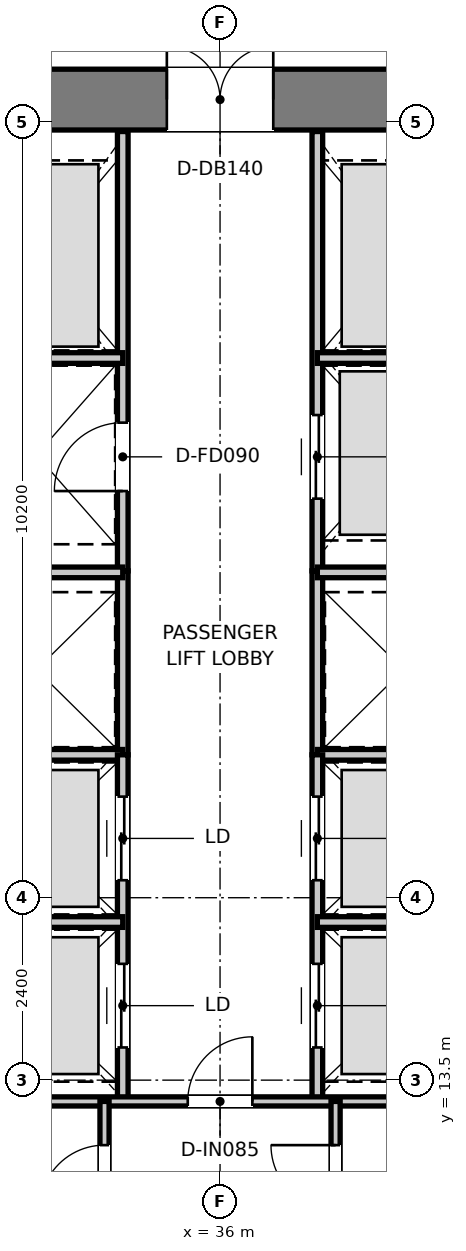
"""IFC4 building model, lengths in metres.
Left out: names, types, materials, properties, quantities, classifications, styles, units other than length and angle.
Written with IfcOpenShell. Run it as: python <this file> out.ifc"""

import sys

from ifc_helpers import new_model, si_unit, direction, frame, frame_2d, origin, place, context, subcontext, project, spatial, rectangle, extrude, element, fill, save


model = new_model("IFC4")
c1 = context("Model", 3, precision=1e-05, world=origin(), true_north=direction((0.0, 1.0)))
c2 = subcontext(c1, "Body", "Model", "MODEL_VIEW")
j1 = project(units=[si_unit("LENGTHUNIT", "METRE"), si_unit("PLANEANGLEUNIT", "RADIAN")], contexts=[c1])
p1 = place(None, origin())
s1 = spatial("IfcSite", under=j1, at=p1, CompositionType="ELEMENT")
p2 = place(p1, origin())
s2 = spatial("IfcBuilding", under=s1, at=p2, CompositionType="ELEMENT")
p3 = place(p2, frame((0.0, 0.0, 105.85)))
s3 = spatial("IfcBuildingStorey", under=s2, at=p3, CompositionType="ELEMENT", Elevation=105.85)
p4 = place(p3, frame((28.08, 26.4, 0.0), z_axis=(0.0, 0.0, 1.0), x_axis=(1.0, 0.0, 0.0)))
e1 = element("IfcWall", 1, at=p4, inside=s3, PredefinedType="SHEAR", context=c2, shape_type="SweptSolid", body=[
    extrude(rectangle(XDim=15.84, YDim=0.8, at=frame_2d((7.92, 0.0))), origin(), (0.0, 0.0, 1.0), 3.95),
])
p5 = place(p4, frame((7.22, 0.0, 0.0)))
e2 = element("IfcOpeningElement", 2, at=p5, cuts=e1, PredefinedType="OPENING", context=c2, shape_type="SweptSolid", body=[
    extrude(rectangle(XDim=1.4, YDim=2.2, at=frame_2d((0.7, 1.1))), frame((0.0, 0.41, 0.0), z_axis=(0.0, -1.0, 0.0), x_axis=(1.0, 0.0, 0.0)), (0.0, 0.0, 1.0), 0.82),
])
p6 = place(p4, frame((1.775, 0.0, 0.0)))
e3 = element("IfcOpeningElement", 3, at=p6, cuts=e1, PredefinedType="OPENING", context=c2, shape_type="SweptSolid", body=[
    extrude(rectangle(XDim=1.05, YDim=2.1, at=frame_2d((0.525, 1.05))), frame((0.0, 0.41, 0.0), z_axis=(0.0, -1.0, 0.0), x_axis=(1.0, 0.0, 0.0)), (0.0, 0.0, 1.0), 0.82),
])
p7 = place(p4, frame((13.015, 0.0, 0.0)))
e4 = element("IfcOpeningElement", 4, at=p7, cuts=e1, PredefinedType="OPENING", context=c2, shape_type="SweptSolid", body=[
    extrude(rectangle(XDim=1.05, YDim=2.1, at=frame_2d((0.525, 1.05))), frame((0.0, 0.41, 0.0), z_axis=(0.0, -1.0, 0.0), x_axis=(1.0, 0.0, 0.0)), (0.0, 0.0, 1.0), 0.82),
])
p8 = place(p3, frame((34.72, 20.2, 0.0), z_axis=(0.0, 0.0, 1.0), x_axis=(0.0, 1.0, 0.0)))
e5 = element("IfcWall", 5, at=p8, inside=s3, PredefinedType="PARTITIONING", context=c2, shape_type="SweptSolid", body=[
    extrude(rectangle(XDim=5.78, YDim=0.14, at=frame_2d((2.89, 0.0))), origin(), (0.0, 0.0, 1.0), 2.67),
])
p9 = place(p8, frame((1.05, 0.0, 0.0)))
e6 = element("IfcOpeningElement", 6, at=p9, cuts=e5, PredefinedType="OPENING", context=c2, shape_type="SweptSolid", body=[
    extrude(rectangle(XDim=0.9, YDim=2.1, at=frame_2d((0.45, 1.05))), frame((0.0, 0.08, 0.0), z_axis=(0.0, -1.0, 0.0), x_axis=(1.0, 0.0, 0.0)), (0.0, 0.0, 1.0), 0.16),
])
p10 = place(p3, frame((37.28, 20.2, 0.0), z_axis=(0.0, 0.0, 1.0), x_axis=(0.0, 1.0, 0.0)))
e7 = element("IfcWall", 7, at=p10, inside=s3, PredefinedType="PARTITIONING", context=c2, shape_type="SweptSolid", body=[
    extrude(rectangle(XDim=5.78, YDim=0.14, at=frame_2d((2.89, 0.0))), origin(), (0.0, 0.0, 1.0), 2.67),
])
p11 = place(p10, frame((0.95, 0.0, 0.0)))
e8 = element("IfcOpeningElement", 8, at=p11, cuts=e7, PredefinedType="OPENING", context=c2, shape_type="SweptSolid", body=[
    extrude(rectangle(XDim=1.1, YDim=2.15, at=frame_2d((0.55, 1.075))), frame((0.0, 0.08, 0.0), z_axis=(0.0, -1.0, 0.0), x_axis=(1.0, 0.0, 0.0)), (0.0, 0.0, 1.0), 0.16),
])
for number, where, z_axis, x_axis in (
    (9, (32.45, 23.0, 0.0), (0.0, 0.0, 1.0), (1.0, 0.0, 0.0)),
    (10, (37.28, 23.0, 0.0), (0.0, 0.0, 1.0), (1.0, 0.0, 0.0)),
):
    element("IfcWall", number, at=place(p3, frame(where, z_axis=z_axis, x_axis=x_axis)), inside=s3, PredefinedType="PARTITIONING", context=c2, shape_type="SweptSolid", body=[
        extrude(rectangle(XDim=2.27, YDim=0.14, at=frame_2d((1.135, 0.0))), origin(), (0.0, 0.0, 1.0), 2.67),
    ])
for number, where, z_axis, x_axis in (
    (11, (34.72, 17.78, 0.0), (0.0, 0.0, 1.0), (0.0, 1.0, 0.0)),
    (12, (37.28, 17.78, 0.0), (0.0, 0.0, 1.0), (0.0, 1.0, 0.0)),
):
    element("IfcWall", number, at=place(p3, frame(where, z_axis=z_axis, x_axis=x_axis)), inside=s3, PredefinedType="PARTITIONING", context=c2, shape_type="SweptSolid", body=[
        extrude(rectangle(XDim=2.42, YDim=0.14, at=frame_2d((1.21, 0.0))), origin(), (0.0, 0.0, 1.0), 3.67),
    ])
for number, where, z_axis, x_axis in (
    (13, (32.45, 17.78, 0.0), (0.0, 0.0, 1.0), (1.0, 0.0, 0.0)),
    (14, (32.45, 20.18, 0.0), (0.0, 0.0, 1.0), (1.0, 0.0, 0.0)),
    (15, (37.28, 17.78, 0.0), (0.0, 0.0, 1.0), (1.0, 0.0, 0.0)),
    (16, (37.28, 20.18, 0.0), (0.0, 0.0, 1.0), (1.0, 0.0, 0.0)),
):
    element("IfcWall", number, at=place(p3, frame(where, z_axis=z_axis, x_axis=x_axis)), inside=s3, PredefinedType="PARTITIONING", context=c2, shape_type="SweptSolid", body=[
        extrude(rectangle(XDim=2.27, YDim=0.14, at=frame_2d((1.135, 0.0))), origin(), (0.0, 0.0, 1.0), 3.67),
    ])
p12 = place(p3, frame((34.72, 13.22, 0.0), z_axis=(0.0, 0.0, 1.0), x_axis=(0.0, 1.0, 0.0)))
e17 = element("IfcWall", 17, at=p12, inside=s3, PredefinedType="PARTITIONING", context=c2, shape_type="SweptSolid", body=[
    extrude(rectangle(XDim=4.56, YDim=0.14, at=frame_2d((2.28, 0.0))), origin(), (0.0, 0.0, 1.0), 3.67),
])
p13 = place(p12, frame((0.71, 0.0, 0.0)))
e18 = element("IfcOpeningElement", 18, at=p13, cuts=e17, PredefinedType="OPENING", context=c2, shape_type="SweptSolid", body=[
    extrude(rectangle(XDim=1.1, YDim=2.15, at=frame_2d((0.55, 1.075))), frame((0.0, 0.08, 0.0), z_axis=(0.0, -1.0, 0.0), x_axis=(1.0, 0.0, 0.0)), (0.0, 0.0, 1.0), 0.16),
])
p14 = place(p12, frame((2.91, 0.0, 0.0)))
e19 = element("IfcOpeningElement", 19, at=p14, cuts=e17, PredefinedType="OPENING", context=c2, shape_type="SweptSolid", body=[
    extrude(rectangle(XDim=1.1, YDim=2.15, at=frame_2d((0.55, 1.075))), frame((0.0, 0.08, 0.0), z_axis=(0.0, -1.0, 0.0), x_axis=(1.0, 0.0, 0.0)), (0.0, 0.0, 1.0), 0.16),
])
p15 = place(p3, frame((32.45, 15.58, 0.0), z_axis=(0.0, 0.0, 1.0), x_axis=(1.0, 0.0, 0.0)))
e20 = element("IfcWall", 20, at=p15, inside=s3, PredefinedType="PARTITIONING", context=c2, shape_type="SweptSolid", body=[
    extrude(rectangle(XDim=2.27, YDim=0.14, at=frame_2d((1.135, 0.0))), origin(), (0.0, 0.0, 1.0), 3.67),
])
p16 = place(p3, frame((37.28, 13.22, 0.0), z_axis=(0.0, 0.0, 1.0), x_axis=(0.0, 1.0, 0.0)))
e21 = element("IfcWall", 21, at=p16, inside=s3, PredefinedType="PARTITIONING", context=c2, shape_type="SweptSolid", body=[
    extrude(rectangle(XDim=4.56, YDim=0.14, at=frame_2d((2.28, 0.0))), origin(), (0.0, 0.0, 1.0), 3.67),
])
p17 = place(p16, frame((0.71, 0.0, 0.0)))
e22 = element("IfcOpeningElement", 22, at=p17, cuts=e21, PredefinedType="OPENING", context=c2, shape_type="SweptSolid", body=[
    extrude(rectangle(XDim=1.1, YDim=2.15, at=frame_2d((0.55, 1.075))), frame((0.0, 0.08, 0.0), z_axis=(0.0, -1.0, 0.0), x_axis=(1.0, 0.0, 0.0)), (0.0, 0.0, 1.0), 0.16),
])
p18 = place(p16, frame((2.91, 0.0, 0.0)))
e23 = element("IfcOpeningElement", 23, at=p18, cuts=e21, PredefinedType="OPENING", context=c2, shape_type="SweptSolid", body=[
    extrude(rectangle(XDim=1.1, YDim=2.15, at=frame_2d((0.55, 1.075))), frame((0.0, 0.08, 0.0), z_axis=(0.0, -1.0, 0.0), x_axis=(1.0, 0.0, 0.0)), (0.0, 0.0, 1.0), 0.16),
])
p19 = place(p3, frame((37.28, 15.58, 0.0), z_axis=(0.0, 0.0, 1.0), x_axis=(1.0, 0.0, 0.0)))
e24 = element("IfcWall", 24, at=p19, inside=s3, PredefinedType="PARTITIONING", context=c2, shape_type="SweptSolid", body=[
    extrude(rectangle(XDim=2.27, YDim=0.14, at=frame_2d((1.135, 0.0))), origin(), (0.0, 0.0, 1.0), 3.67),
])
p20 = place(p3, frame((32.21, 13.22, 0.0), z_axis=(0.0, 0.0, 1.0), x_axis=(1.0, 0.0, 0.0)))
e25 = element("IfcWall", 25, at=p20, inside=s3, PredefinedType="PARTITIONING", context=c2, shape_type="SweptSolid", body=[
    extrude(rectangle(XDim=7.58, YDim=0.12, at=frame_2d((3.79, 0.0))), origin(), (0.0, 0.0, 1.0), 3.67),
])
p21 = place(p20, frame((3.365, 0.0, 0.0)))
e26 = element("IfcOpeningElement", 26, at=p21, cuts=e25, PredefinedType="OPENING", context=c2, shape_type="SweptSolid", body=[
    extrude(rectangle(XDim=0.85, YDim=2.1, at=frame_2d((0.425, 1.05))), frame((0.0, 0.07, 0.0), z_axis=(0.0, -1.0, 0.0), x_axis=(1.0, 0.0, 0.0)), (0.0, 0.0, 1.0), 0.14),
])
p22 = place(p3, frame((34.48, 11.25, 0.0), z_axis=(0.0, 0.0, 1.0), x_axis=(0.0, 1.0, 0.0)))
e27 = element("IfcWall", 27, at=p22, inside=s3, PredefinedType="PARTITIONING", context=c2, shape_type="SweptSolid", body=[
    extrude(rectangle(XDim=1.97, YDim=0.12, at=frame_2d((0.985, 0.0))), origin(), (0.0, 0.0, 1.0), 3.67),
])
p23 = place(p22, frame((0.545, 0.0, 0.0)))
e28 = element("IfcOpeningElement", 28, at=p23, cuts=e27, PredefinedType="OPENING", context=c2, shape_type="SweptSolid", body=[
    extrude(rectangle(XDim=0.85, YDim=2.1, at=frame_2d((0.425, 1.05))), frame((0.0, 0.07, 0.0), z_axis=(0.0, -1.0, 0.0), x_axis=(1.0, 0.0, 0.0)), (0.0, 0.0, 1.0), 0.14),
])
p24 = place(p3, frame((37.52, 11.25, 0.0), z_axis=(0.0, 0.0, 1.0), x_axis=(0.0, 1.0, 0.0)))
e29 = element("IfcWall", 29, at=p24, inside=s3, PredefinedType="PARTITIONING", context=c2, shape_type="SweptSolid", body=[
    extrude(rectangle(XDim=1.97, YDim=0.12, at=frame_2d((0.985, 0.0))), origin(), (0.0, 0.0, 1.0), 3.67),
])
p25 = place(p24, frame((0.545, 0.0, 0.0)))
e30 = element("IfcOpeningElement", 30, at=p25, cuts=e29, PredefinedType="OPENING", context=c2, shape_type="SweptSolid", body=[
    extrude(rectangle(XDim=0.85, YDim=2.1, at=frame_2d((0.425, 1.05))), frame((0.0, 0.07, 0.0), z_axis=(0.0, -1.0, 0.0), x_axis=(1.0, 0.0, 0.0)), (0.0, 0.0, 1.0), 0.14),
])
p26 = place(p5, origin())
e31 = element("IfcDoor", 31, at=p26, inside=s3, OperationType="DOUBLE_DOOR_SINGLE_SWING", PredefinedType="DOOR", context=c2, shape_type="SweptSolid", body=[
    extrude(rectangle(XDim=1.4, YDim=2.2, at=frame_2d((0.7, 1.1))), frame((0.0, 0.025, 0.0), z_axis=(0.0, -1.0, 0.0), x_axis=(1.0, 0.0, 0.0)), (0.0, 0.0, 1.0), 0.05),
])
fill(e2, e31)
p27 = place(p9, origin())
e32 = element("IfcDoor", 32, at=p27, inside=s3, OperationType="SINGLE_SWING_LEFT", PredefinedType="DOOR", context=c2, shape_type="SweptSolid", body=[
    extrude(rectangle(XDim=0.9, YDim=2.1, at=frame_2d((0.45, 1.05))), frame((0.0, 0.025, 0.0), z_axis=(0.0, -1.0, 0.0), x_axis=(1.0, 0.0, 0.0)), (0.0, 0.0, 1.0), 0.05),
])
fill(e6, e32)
p28 = place(p11, origin())
e33 = element("IfcDoor", 33, at=p28, inside=s3, OperationType="DOUBLE_DOOR_SLIDING", PredefinedType="DOOR", context=c2, shape_type="SweptSolid", body=[
    extrude(rectangle(XDim=1.1, YDim=2.15, at=frame_2d((0.55, 1.075))), frame((0.0, 0.025, 0.0), z_axis=(0.0, -1.0, 0.0), x_axis=(1.0, 0.0, 0.0)), (0.0, 0.0, 1.0), 0.05),
])
fill(e8, e33)
p29 = place(p13, origin())
e34 = element("IfcDoor", 34, at=p29, inside=s3, OperationType="DOUBLE_DOOR_SLIDING", PredefinedType="DOOR", context=c2, shape_type="SweptSolid", body=[
    extrude(rectangle(XDim=1.1, YDim=2.15, at=frame_2d((0.55, 1.075))), frame((0.0, 0.025, 0.0), z_axis=(0.0, -1.0, 0.0), x_axis=(1.0, 0.0, 0.0)), (0.0, 0.0, 1.0), 0.05),
])
fill(e18, e34)
p30 = place(p14, origin())
e35 = element("IfcDoor", 35, at=p30, inside=s3, OperationType="DOUBLE_DOOR_SLIDING", PredefinedType="DOOR", context=c2, shape_type="SweptSolid", body=[
    extrude(rectangle(XDim=1.1, YDim=2.15, at=frame_2d((0.55, 1.075))), frame((0.0, 0.025, 0.0), z_axis=(0.0, -1.0, 0.0), x_axis=(1.0, 0.0, 0.0)), (0.0, 0.0, 1.0), 0.05),
])
fill(e19, e35)
p31 = place(p17, origin())
e36 = element("IfcDoor", 36, at=p31, inside=s3, OperationType="DOUBLE_DOOR_SLIDING", PredefinedType="DOOR", context=c2, shape_type="SweptSolid", body=[
    extrude(rectangle(XDim=1.1, YDim=2.15, at=frame_2d((0.55, 1.075))), frame((0.0, 0.025, 0.0), z_axis=(0.0, -1.0, 0.0), x_axis=(1.0, 0.0, 0.0)), (0.0, 0.0, 1.0), 0.05),
])
fill(e22, e36)
p32 = place(p18, origin())
e37 = element("IfcDoor", 37, at=p32, inside=s3, OperationType="DOUBLE_DOOR_SLIDING", PredefinedType="DOOR", context=c2, shape_type="SweptSolid", body=[
    extrude(rectangle(XDim=1.1, YDim=2.15, at=frame_2d((0.55, 1.075))), frame((0.0, 0.025, 0.0), z_axis=(0.0, -1.0, 0.0), x_axis=(1.0, 0.0, 0.0)), (0.0, 0.0, 1.0), 0.05),
])
fill(e23, e37)
p33 = place(p21, origin())
e38 = element("IfcDoor", 38, at=p33, inside=s3, OperationType="SINGLE_SWING_RIGHT", PredefinedType="DOOR", context=c2, shape_type="SweptSolid", body=[
    extrude(rectangle(XDim=0.85, YDim=2.1, at=frame_2d((0.425, 1.05))), frame((0.0, 0.025, 0.0), z_axis=(0.0, -1.0, 0.0), x_axis=(1.0, 0.0, 0.0)), (0.0, 0.0, 1.0), 0.05),
])
fill(e26, e38)
p34 = place(p23, origin())
e39 = element("IfcDoor", 39, at=p34, inside=s3, OperationType="SINGLE_SWING_LEFT", PredefinedType="DOOR", context=c2, shape_type="SweptSolid", body=[
    extrude(rectangle(XDim=0.85, YDim=2.1, at=frame_2d((0.425, 1.05))), frame((0.0, 0.025, 0.0), z_axis=(0.0, -1.0, 0.0), x_axis=(1.0, 0.0, 0.0)), (0.0, 0.0, 1.0), 0.05),
])
fill(e28, e39)
p35 = place(p25, origin())
e40 = element("IfcDoor", 40, at=p35, inside=s3, OperationType="SINGLE_SWING_RIGHT", PredefinedType="DOOR", context=c2, shape_type="SweptSolid", body=[
    extrude(rectangle(XDim=0.85, YDim=2.1, at=frame_2d((0.425, 1.05))), frame((0.0, 0.025, 0.0), z_axis=(0.0, -1.0, 0.0), x_axis=(1.0, 0.0, 0.0)), (0.0, 0.0, 1.0), 0.05),
])
fill(e30, e40)
save(model, sys.argv[1])
